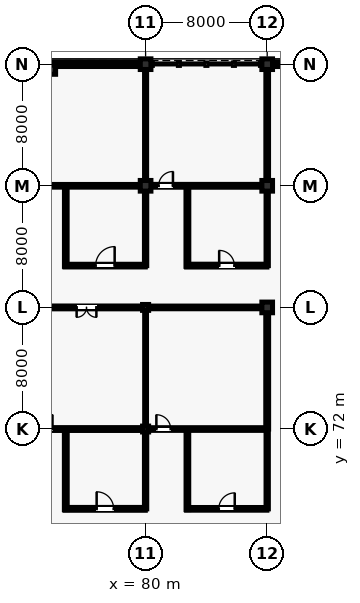
"""IFC4 building model, lengths in metres.
Left out: names, types, materials, properties, quantities, classifications, styles, units other than length and angle.
Written with IfcOpenShell. Run it as: python <this file> out.ifc"""

import sys

from ifc_helpers import new_model, si_unit, direction, frame, frame_2d, origin, origin_2d, place, context, subcontext, project, spatial, rectangle, i_section, extrude, element, fill, save


model = new_model("IFC4")
c1 = context("Model", 3, precision=1e-05, world=origin(), true_north=direction((0.0, 1.0)))
c2 = subcontext(c1, "Body", "Model", "MODEL_VIEW")
j1 = project(units=[si_unit("LENGTHUNIT", "METRE"), si_unit("PLANEANGLEUNIT", "RADIAN")], contexts=[c1])
p1 = place(None, origin())
s1 = spatial("IfcSite", under=j1, at=p1, CompositionType="ELEMENT")
p2 = place(p1, origin())
s2 = spatial("IfcBuilding", under=s1, at=p2, CompositionType="ELEMENT")
p3 = place(p2, origin())
s3 = spatial("IfcBuildingStorey", under=s2, at=p3, CompositionType="ELEMENT", Elevation=0.0)
for number, where, z_axis, x_axis in (
    (1, (80.0, 72.0, 0.0), (0.0, 0.0, 1.0), (1.0, 0.0, 0.0)),
    (2, (80.0, 80.0, 0.0), (0.0, 0.0, 1.0), (1.0, 0.0, 0.0)),
):
    element("IfcColumn", number, at=place(p3, frame(where, z_axis=z_axis, x_axis=x_axis)), inside=s3, PredefinedType="COLUMN", context=c2, shape_type="SweptSolid", body=[
        extrude(i_section(OverallWidth=0.398, OverallDepth=0.387, WebThickness=0.021, FlangeThickness=0.033, FilletRadius=0.015, at=origin_2d()), origin(), (0.0, 0.0, 1.0), 5.28),
    ])
for number, where, z_axis, x_axis in (
    (3, (80.0, 88.0, 0.0), (0.0, 0.0, 1.0), (1.0, 0.0, 0.0)),
    (4, (80.0, 96.0, 0.0), (0.0, 0.0, 1.0), (1.0, 0.0, 0.0)),
    (5, (88.0, 80.0, 0.0), (0.0, 0.0, 1.0), (1.0, 0.0, 0.0)),
    (6, (88.0, 88.0, 0.0), (0.0, 0.0, 1.0), (1.0, 0.0, 0.0)),
    (7, (88.0, 96.0, 0.0), (0.0, 0.0, 1.0), (1.0, 0.0, 0.0)),
):
    element("IfcColumn", number, at=place(p3, frame(where, z_axis=z_axis, x_axis=x_axis)), inside=s3, PredefinedType="COLUMN", context=c2, shape_type="SweptSolid", body=[
        extrude(rectangle(XDim=0.7, YDim=0.7, at=origin_2d()), origin(), (0.0, 0.0, 1.0), 5.28),
    ])
p4 = place(p3, frame((73.779, 95.636, 0.0), z_axis=(0.0, 0.0, 1.0), x_axis=(1.0, 0.0, 0.0)))
e8 = element("IfcColumn", 8, at=p4, inside=s3, PredefinedType="COLUMN", context=c2, shape_type="SweptSolid", body=[
    extrude(rectangle(XDim=0.6, YDim=0.6, at=origin_2d()), origin(), (0.0, 0.0, 1.0), 5.28),
])
p5 = place(p3, frame((73.854, 96.0, 0.0), z_axis=(0.0, 0.0, 1.0), x_axis=(1.0, 0.0, 0.0)))
e9 = element("IfcWall", 9, at=p5, inside=s3, PredefinedType="SOLIDWALL", context=c2, shape_type="SweptSolid", body=[
    extrude(rectangle(XDim=5.811, YDim=0.305, at=frame_2d((2.905, 0.0))), origin(), (0.0, 0.0, 1.0), 5.035),
])
p6 = place(p5, frame((1.705, 0.0, 0.9)))
e10 = element("IfcOpeningElement", 10, at=p6, cuts=e9, PredefinedType="OPENING", context=c2, shape_type="SweptSolid", body=[
    extrude(rectangle(XDim=2.4, YDim=2.8, at=frame_2d((1.2, 1.4))), frame((0.0, 0.162, 0.0), z_axis=(0.0, -1.0, 0.0), x_axis=(1.0, 0.0, 0.0)), (0.0, 0.0, 1.0), 0.325),
])
p7 = place(p3, frame((88.335, 96.0, 0.0), z_axis=(0.0, 0.0, 1.0), x_axis=(1.0, 0.0, 0.0)))
e11 = element("IfcWall", 11, at=p7, inside=s3, PredefinedType="SOLIDWALL", context=c2, shape_type="SweptSolid", body=[
    extrude(rectangle(XDim=7.33, YDim=0.305, at=frame_2d((3.665, 0.0))), origin(), (0.0, 0.0, 1.0), 4.677),
])
p8 = place(p7, frame((0.744, 0.0, 0.95)))
e12 = element("IfcOpeningElement", 12, at=p8, cuts=e11, PredefinedType="OPENING", context=c2, shape_type="SweptSolid", body=[
    extrude(rectangle(XDim=1.15, YDim=1.65, at=frame_2d((0.575, 0.825))), frame((0.0, 0.162, 0.0), z_axis=(0.0, -1.0, 0.0), x_axis=(1.0, 0.0, 0.0)), (0.0, 0.0, 1.0), 0.325),
])
p9 = place(p7, frame((5.436, 0.0, 0.95)))
e13 = element("IfcOpeningElement", 13, at=p9, cuts=e11, PredefinedType="OPENING", context=c2, shape_type="SweptSolid", body=[
    extrude(rectangle(XDim=1.15, YDim=1.65, at=frame_2d((0.575, 0.825))), frame((0.0, 0.162, 0.0), z_axis=(0.0, -1.0, 0.0), x_axis=(1.0, 0.0, 0.0)), (0.0, 0.0, 1.0), 0.325),
])
p10 = place(p3, frame((74.7, 66.75, 0.0), z_axis=(0.0, 0.0, 1.0), x_axis=(1.0, 0.0, 0.0)))
e14 = element("IfcWall", 14, at=p10, inside=s3, PredefinedType="PARTITIONING", context=c2, shape_type="SweptSolid", body=[
    extrude(rectangle(XDim=5.28, YDim=0.185, at=frame_2d((2.64, 0.0))), origin(), (0.0, 0.0, 1.0), 4.404),
])
p11 = place(p10, frame((2.08, 0.0, 0.0)))
e15 = element("IfcOpeningElement", 15, at=p11, cuts=e14, PredefinedType="OPENING", context=c2, shape_type="SweptSolid", body=[
    extrude(rectangle(XDim=1.12, YDim=2.22, at=frame_2d((0.56, 1.11))), frame((0.0, 0.103, 0.0), z_axis=(0.0, -1.0, 0.0), x_axis=(1.0, 0.0, 0.0)), (0.0, 0.0, 1.0), 0.205),
])
p12 = place(p3, frame((74.75, 66.7, 0.0), z_axis=(0.0, 0.0, 1.0), x_axis=(0.0, 1.0, 0.0)))
e16 = element("IfcWall", 16, at=p12, inside=s3, PredefinedType="PARTITIONING", context=c2, shape_type="SweptSolid", body=[
    extrude(rectangle(XDim=5.28, YDim=0.185, at=frame_2d((2.64, 0.0))), origin(), (0.0, 0.0, 1.0), 4.336),
])
p13 = place(p3, frame((80.0, 66.75, 0.0), z_axis=(0.0, 0.0, 1.0), x_axis=(0.0, 1.0, 0.0)))
e17 = element("IfcWall", 17, at=p13, inside=s3, PredefinedType="PARTITIONING", context=c2, shape_type="SweptSolid", body=[
    extrude(rectangle(XDim=5.046, YDim=0.15, at=frame_2d((2.523, 0.0))), origin(), (0.0, 0.0, 1.0), 4.404),
])
p14 = place(p3, frame((74.7, 82.75, 0.0), z_axis=(0.0, 0.0, 1.0), x_axis=(1.0, 0.0, 0.0)))
e18 = element("IfcWall", 18, at=p14, inside=s3, PredefinedType="PARTITIONING", context=c2, shape_type="SweptSolid", body=[
    extrude(rectangle(XDim=5.28, YDim=0.175, at=frame_2d((2.64, 0.0))), origin(), (0.0, 0.0, 1.0), 4.403),
])
p15 = place(p14, frame((2.015, 0.0, 0.0)))
e19 = element("IfcOpeningElement", 19, at=p15, cuts=e18, PredefinedType="OPENING", context=c2, shape_type="SweptSolid", body=[
    extrude(rectangle(XDim=1.25, YDim=2.18, at=frame_2d((0.625, 1.09))), frame((0.0, 0.097, 0.0), z_axis=(0.0, -1.0, 0.0), x_axis=(1.0, 0.0, 0.0)), (0.0, 0.0, 1.0), 0.195),
])
p16 = place(p3, frame((74.75, 82.7, 0.0), z_axis=(0.0, 0.0, 1.0), x_axis=(0.0, 1.0, 0.0)))
e20 = element("IfcWall", 20, at=p16, inside=s3, PredefinedType="PARTITIONING", context=c2, shape_type="SweptSolid", body=[
    extrude(rectangle(XDim=5.28, YDim=0.175, at=frame_2d((2.64, 0.0))), origin(), (0.0, 0.0, 1.0), 4.327),
])
p17 = place(p3, frame((80.0, 82.75, 0.0), z_axis=(0.0, 0.0, 1.0), x_axis=(0.0, 1.0, 0.0)))
e21 = element("IfcWall", 21, at=p17, inside=s3, PredefinedType="PARTITIONING", context=c2, shape_type="SweptSolid", body=[
    extrude(rectangle(XDim=4.89, YDim=0.15, at=frame_2d((2.445, 0.0))), origin(), (0.0, 0.0, 1.0), 4.403),
])
p18 = place(p3, frame((82.7, 66.75, 0.0), z_axis=(0.0, 0.0, 1.0), x_axis=(1.0, 0.0, 0.0)))
e22 = element("IfcWall", 22, at=p18, inside=s3, PredefinedType="PARTITIONING", context=c2, shape_type="SweptSolid", body=[
    extrude(rectangle(XDim=5.28, YDim=0.175, at=frame_2d((2.64, 0.0))), origin(), (0.0, 0.0, 1.0), 5.025),
])
p19 = place(p18, frame((2.115, 0.0, 0.0)))
e23 = element("IfcOpeningElement", 23, at=p19, cuts=e22, PredefinedType="OPENING", context=c2, shape_type="SweptSolid", body=[
    extrude(rectangle(XDim=1.05, YDim=2.15, at=frame_2d((0.525, 1.075))), frame((0.0, 0.097, 0.0), z_axis=(0.0, -1.0, 0.0), x_axis=(1.0, 0.0, 0.0)), (0.0, 0.0, 1.0), 0.195),
])
p20 = place(p3, frame((82.75, 66.7, 0.0), z_axis=(0.0, 0.0, 1.0), x_axis=(0.0, 1.0, 0.0)))
e24 = element("IfcWall", 24, at=p20, inside=s3, PredefinedType="PARTITIONING", context=c2, shape_type="SweptSolid", body=[
    extrude(rectangle(XDim=5.28, YDim=0.175, at=frame_2d((2.64, 0.0))), origin(), (0.0, 0.0, 1.0), 4.262),
])
p21 = place(p3, frame((88.0, 66.75, 0.0), z_axis=(0.0, 0.0, 1.0), x_axis=(0.0, 1.0, 0.0)))
e25 = element("IfcWall", 25, at=p21, inside=s3, PredefinedType="PARTITIONING", context=c2, shape_type="SweptSolid", body=[
    extrude(rectangle(XDim=5.23, YDim=0.15, at=frame_2d((2.615, 0.0))), origin(), (0.0, 0.0, 1.0), 4.262),
])
p22 = place(p3, frame((82.7, 82.75, 0.0), z_axis=(0.0, 0.0, 1.0), x_axis=(1.0, 0.0, 0.0)))
e26 = element("IfcWall", 26, at=p22, inside=s3, PredefinedType="PARTITIONING", context=c2, shape_type="SweptSolid", body=[
    extrude(rectangle(XDim=5.28, YDim=0.185, at=frame_2d((2.64, 0.0))), origin(), (0.0, 0.0, 1.0), 4.412),
])
p23 = place(p22, frame((2.14, 0.0, 0.0)))
e27 = element("IfcOpeningElement", 27, at=p23, cuts=e26, PredefinedType="OPENING", context=c2, shape_type="SweptSolid", body=[
    extrude(rectangle(XDim=1.0, YDim=2.15, at=frame_2d((0.5, 1.075))), frame((0.0, 0.103, 0.0), z_axis=(0.0, -1.0, 0.0), x_axis=(1.0, 0.0, 0.0)), (0.0, 0.0, 1.0), 0.205),
])
p24 = place(p3, frame((82.75, 82.7, 0.0), z_axis=(0.0, 0.0, 1.0), x_axis=(0.0, 1.0, 0.0)))
e28 = element("IfcWall", 28, at=p24, inside=s3, PredefinedType="PARTITIONING", context=c2, shape_type="SweptSolid", body=[
    extrude(rectangle(XDim=5.28, YDim=0.185, at=frame_2d((2.64, 0.0))), origin(), (0.0, 0.0, 1.0), 4.403),
])
p25 = place(p3, frame((88.0, 82.75, 0.0), z_axis=(0.0, 0.0, 1.0), x_axis=(0.0, 1.0, 0.0)))
e29 = element("IfcWall", 29, at=p25, inside=s3, PredefinedType="PARTITIONING", context=c2, shape_type="SweptSolid", body=[
    extrude(rectangle(XDim=4.89, YDim=0.15, at=frame_2d((2.445, 0.0))), origin(), (0.0, 0.0, 1.0), 4.412),
])
p26 = place(p3, frame((72.415, 72.0, 0.0), z_axis=(0.0, 0.0, 1.0), x_axis=(1.0, 0.0, 0.0)))
e30 = element("IfcWall", 30, at=p26, inside=s3, PredefinedType="PARTITIONING", context=c2, shape_type="SweptSolid", body=[
    extrude(rectangle(XDim=7.396, YDim=0.185, at=frame_2d((3.698, 0.0))), origin(), (0.0, 0.0, 1.0), 4.336),
])
p27 = place(p26, frame((0.52, 0.0, 0.0)))
e31 = element("IfcOpeningElement", 31, at=p27, cuts=e30, PredefinedType="OPENING", context=c2, shape_type="SweptSolid", body=[
    extrude(rectangle(XDim=0.94, YDim=2.12, at=frame_2d((0.47, 1.06))), frame((0.0, 0.103, 0.0), z_axis=(0.0, -1.0, 0.0), x_axis=(1.0, 0.0, 0.0)), (0.0, 0.0, 1.0), 0.205),
])
p28 = place(p3, frame((80.0, 72.184, 0.0), z_axis=(0.0, 0.0, 1.0), x_axis=(0.0, 1.0, 0.0)))
e32 = element("IfcWall", 32, at=p28, inside=s3, PredefinedType="PARTITIONING", context=c2, shape_type="SweptSolid", body=[
    extrude(rectangle(XDim=7.633, YDim=0.12, at=frame_2d((3.816, 0.0))), origin(), (0.0, 0.0, 1.0), 4.471),
])
p29 = place(p3, frame((72.415, 80.0, 0.0), z_axis=(0.0, 0.0, 1.0), x_axis=(1.0, 0.0, 0.0)))
e33 = element("IfcWall", 33, at=p29, inside=s3, PredefinedType="PARTITIONING", context=c2, shape_type="SweptSolid", body=[
    extrude(rectangle(XDim=7.396, YDim=0.185, at=frame_2d((3.698, 0.0))), origin(), (0.0, 0.0, 1.0), 4.404),
])
p30 = place(p29, frame((3.048, 0.0, 0.0)))
e34 = element("IfcOpeningElement", 34, at=p30, cuts=e33, PredefinedType="OPENING", context=c2, shape_type="SweptSolid", body=[
    extrude(rectangle(XDim=1.3, YDim=2.2, at=frame_2d((0.65, 1.1))), frame((0.0, 0.103, 0.0), z_axis=(0.0, -1.0, 0.0), x_axis=(1.0, 0.0, 0.0)), (0.0, 0.0, 1.0), 0.205),
])
p31 = place(p3, frame((72.34, 88.0, 0.0), z_axis=(0.0, 0.0, 1.0), x_axis=(1.0, 0.0, 0.0)))
e35 = element("IfcWall", 35, at=p31, inside=s3, PredefinedType="PARTITIONING", context=c2, shape_type="SweptSolid", body=[
    extrude(rectangle(XDim=7.32, YDim=0.175, at=frame_2d((3.66, 0.0))), origin(), (0.0, 0.0, 1.0), 4.327),
])
p32 = place(p31, frame((0.52, 0.0, 0.0)))
e36 = element("IfcOpeningElement", 36, at=p32, cuts=e35, PredefinedType="OPENING", context=c2, shape_type="SweptSolid", body=[
    extrude(rectangle(XDim=0.94, YDim=2.12, at=frame_2d((0.47, 1.06))), frame((0.0, 0.097, 0.0), z_axis=(0.0, -1.0, 0.0), x_axis=(1.0, 0.0, 0.0)), (0.0, 0.0, 1.0), 0.195),
])
p33 = place(p3, frame((80.0, 88.34, 0.0), z_axis=(0.0, 0.0, 1.0), x_axis=(0.0, 1.0, 0.0)))
e37 = element("IfcWall", 37, at=p33, inside=s3, PredefinedType="PARTITIONING", context=c2, shape_type="SweptSolid", body=[
    extrude(rectangle(XDim=7.32, YDim=0.135, at=frame_2d((3.66, 0.0))), origin(), (0.0, 0.0, 1.0), 4.412),
])
p34 = place(p3, frame((80.189, 72.0, 0.0), z_axis=(0.0, 0.0, 1.0), x_axis=(1.0, 0.0, 0.0)))
e38 = element("IfcWall", 38, at=p34, inside=s3, PredefinedType="PARTITIONING", context=c2, shape_type="SweptSolid", body=[
    extrude(rectangle(XDim=7.811, YDim=0.175, at=frame_2d((3.906, 0.0))), origin(), (0.0, 0.0, 1.0), 4.262),
])
p35 = place(p34, frame((0.52, 0.0, 0.0)))
e39 = element("IfcOpeningElement", 39, at=p35, cuts=e38, PredefinedType="OPENING", context=c2, shape_type="SweptSolid", body=[
    extrude(rectangle(XDim=0.94, YDim=2.12, at=frame_2d((0.47, 1.06))), frame((0.0, 0.097, 0.0), z_axis=(0.0, -1.0, 0.0), x_axis=(1.0, 0.0, 0.0)), (0.0, 0.0, 1.0), 0.195),
])
p36 = place(p3, frame((88.0, 72.0, 0.0), z_axis=(0.0, 0.0, 1.0), x_axis=(0.0, 1.0, 0.0)))
e40 = element("IfcWall", 40, at=p36, inside=s3, PredefinedType="PARTITIONING", context=c2, shape_type="SweptSolid", body=[
    extrude(rectangle(XDim=7.66, YDim=0.185, at=frame_2d((3.83, 0.0))), origin(), (0.0, 0.0, 1.0), 4.262),
])
p37 = place(p3, frame((80.189, 80.0, 0.0), z_axis=(0.0, 0.0, 1.0), x_axis=(1.0, 0.0, 0.0)))
e41 = element("IfcWall", 41, at=p37, inside=s3, PredefinedType="PARTITIONING", context=c2, shape_type="SweptSolid", body=[
    extrude(rectangle(XDim=7.471, YDim=0.175, at=frame_2d((3.735, 0.0))), origin(), (0.0, 0.0, 1.0), 4.327),
])
p38 = place(p3, frame((80.34, 88.0, 0.0), z_axis=(0.0, 0.0, 1.0), x_axis=(1.0, 0.0, 0.0)))
e42 = element("IfcWall", 42, at=p38, inside=s3, PredefinedType="PARTITIONING", context=c2, shape_type="SweptSolid", body=[
    extrude(rectangle(XDim=7.32, YDim=0.185, at=frame_2d((3.66, 0.0))), origin(), (0.0, 0.0, 1.0), 4.403),
])
p39 = place(p38, frame((0.52, 0.0, 0.0)))
e43 = element("IfcOpeningElement", 43, at=p39, cuts=e42, PredefinedType="OPENING", context=c2, shape_type="SweptSolid", body=[
    extrude(rectangle(XDim=0.94, YDim=2.12, at=frame_2d((0.47, 1.06))), frame((0.0, 0.103, 0.0), z_axis=(0.0, -1.0, 0.0), x_axis=(1.0, 0.0, 0.0)), (0.0, 0.0, 1.0), 0.205),
])
p40 = place(p3, frame((88.0, 88.34, 0.0), z_axis=(0.0, 0.0, 1.0), x_axis=(0.0, 1.0, 0.0)))
e44 = element("IfcWall", 44, at=p40, inside=s3, PredefinedType="PARTITIONING", context=c2, shape_type="SweptSolid", body=[
    extrude(rectangle(XDim=7.32, YDim=0.175, at=frame_2d((3.66, 0.0))), origin(), (0.0, 0.0, 1.0), 4.404),
])
p41 = place(p6, origin())
e45 = element("IfcWindow", 45, at=p41, inside=s3, PartitioningType="SINGLE_PANEL", PredefinedType="WINDOW", context=c2, shape_type="SweptSolid", body=[
    extrude(rectangle(XDim=2.4, YDim=2.8, at=frame_2d((1.2, 1.4))), frame((0.0, 0.03, 0.0), z_axis=(0.0, -1.0, 0.0), x_axis=(1.0, 0.0, 0.0)), (0.0, 0.0, 1.0), 0.06),
])
fill(e10, e45)
p42 = place(p11, origin())
e46 = element("IfcDoor", 46, at=p42, inside=s3, OperationType="SINGLE_SWING_LEFT", PredefinedType="DOOR", context=c2, shape_type="SweptSolid", body=[
    extrude(rectangle(XDim=1.12, YDim=2.22, at=frame_2d((0.56, 1.11))), frame((0.0, 0.025, 0.0), z_axis=(0.0, -1.0, 0.0), x_axis=(1.0, 0.0, 0.0)), (0.0, 0.0, 1.0), 0.05),
])
fill(e15, e46)
p43 = place(p15, origin())
e47 = element("IfcDoor", 47, at=p43, inside=s3, OperationType="SINGLE_SWING_RIGHT", PredefinedType="DOOR", context=c2, shape_type="SweptSolid", body=[
    extrude(rectangle(XDim=1.25, YDim=2.18, at=frame_2d((0.625, 1.09))), frame((0.0, 0.025, 0.0), z_axis=(0.0, -1.0, 0.0), x_axis=(1.0, 0.0, 0.0)), (0.0, 0.0, 1.0), 0.05),
])
fill(e19, e47)
p44 = place(p19, origin())
e48 = element("IfcDoor", 48, at=p44, inside=s3, OperationType="SINGLE_SWING_RIGHT", PredefinedType="DOOR", context=c2, shape_type="SweptSolid", body=[
    extrude(rectangle(XDim=1.05, YDim=2.15, at=frame_2d((0.525, 1.075))), frame((0.0, 0.025, 0.0), z_axis=(0.0, -1.0, 0.0), x_axis=(1.0, 0.0, 0.0)), (0.0, 0.0, 1.0), 0.05),
])
fill(e23, e48)
p45 = place(p23, origin())
e49 = element("IfcDoor", 49, at=p45, inside=s3, OperationType="SINGLE_SWING_LEFT", PredefinedType="DOOR", context=c2, shape_type="SweptSolid", body=[
    extrude(rectangle(XDim=1.0, YDim=2.15, at=frame_2d((0.5, 1.075))), frame((0.0, 0.025, 0.0), z_axis=(0.0, -1.0, 0.0), x_axis=(1.0, 0.0, 0.0)), (0.0, 0.0, 1.0), 0.05),
])
fill(e27, e49)
p46 = place(p27, origin())
e50 = element("IfcDoor", 50, at=p46, inside=s3, OperationType="SINGLE_SWING_RIGHT", PredefinedType="DOOR", context=c2, shape_type="SweptSolid", body=[
    extrude(rectangle(XDim=0.94, YDim=2.12, at=frame_2d((0.47, 1.06))), frame((0.0, 0.025, 0.0), z_axis=(0.0, -1.0, 0.0), x_axis=(1.0, 0.0, 0.0)), (0.0, 0.0, 1.0), 0.05),
])
fill(e31, e50)
p47 = place(p30, frame((1.3, 0.0, 0.0), z_axis=(0.0, 0.0, 1.0), x_axis=(-1.0, 0.0, 0.0)))
e51 = element("IfcDoor", 51, at=p47, inside=s3, OperationType="DOUBLE_DOOR_SINGLE_SWING", PredefinedType="DOOR", context=c2, shape_type="SweptSolid", body=[
    extrude(rectangle(XDim=1.3, YDim=2.2, at=frame_2d((0.65, 1.1))), frame((0.0, 0.025, 0.0), z_axis=(0.0, -1.0, 0.0), x_axis=(1.0, 0.0, 0.0)), (0.0, 0.0, 1.0), 0.05),
])
fill(e34, e51)
p48 = place(p35, origin())
e52 = element("IfcDoor", 52, at=p48, inside=s3, OperationType="SINGLE_SWING_LEFT", PredefinedType="DOOR", context=c2, shape_type="SweptSolid", body=[
    extrude(rectangle(XDim=0.94, YDim=2.12, at=frame_2d((0.47, 1.06))), frame((0.0, 0.025, 0.0), z_axis=(0.0, -1.0, 0.0), x_axis=(1.0, 0.0, 0.0)), (0.0, 0.0, 1.0), 0.05),
])
fill(e39, e52)
p49 = place(p39, origin())
e53 = element("IfcDoor", 53, at=p49, inside=s3, OperationType="SINGLE_SWING_RIGHT", PredefinedType="DOOR", context=c2, shape_type="SweptSolid", body=[
    extrude(rectangle(XDim=0.94, YDim=2.12, at=frame_2d((0.47, 1.06))), frame((0.0, 0.025, 0.0), z_axis=(0.0, -1.0, 0.0), x_axis=(1.0, 0.0, 0.0)), (0.0, 0.0, 1.0), 0.05),
])
fill(e43, e53)
save(model, sys.argv[1])
